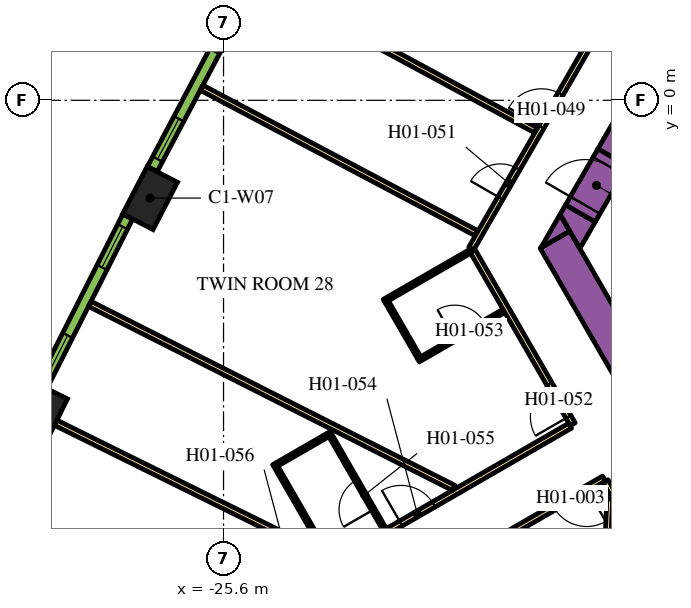
"""IFC4 building model, lengths in metres.
Left out: names, types, materials, properties, quantities, classifications, styles, units other than length and angle.
Written with IfcOpenShell. Run it as: python <this file> out.ifc"""

import sys

from ifc_helpers import new_model, si_unit, direction, frame, frame_2d, origin, origin_2d, place, context, subcontext, project, spatial, polyline, rectangle, outline, extrude, element, fill, save


model = new_model("IFC4")
c1 = context("Model", 3, precision=1e-05, world=origin(), true_north=direction((0.0, 1.0)))
c2 = subcontext(c1, "Body", "Model", "MODEL_VIEW")
j1 = project(units=[si_unit("LENGTHUNIT", "METRE"), si_unit("PLANEANGLEUNIT", "RADIAN")], contexts=[c1])
p1 = place(None, origin())
s1 = spatial("IfcSite", under=j1, at=p1, CompositionType="ELEMENT")
p2 = place(p1, origin())
s2 = spatial("IfcBuilding", under=s1, at=p2, CompositionType="ELEMENT")
p3 = place(p2, frame((0.0, 0.0, 31.5)))
s3 = spatial("IfcBuildingStorey", under=s2, at=p3, CompositionType="ELEMENT", Elevation=31.5)
for number, where, z_axis, x_axis in (
    (1, (-27.533, -2.572, 0.0), (0.0, 0.0, 1.0), (-0.459, -0.888, 0.0)),
    (2, (-30.421, -8.284, 0.0), (0.0, 0.0, 1.0), (-0.443, -0.897, 0.0)),
):
    element("IfcColumn", number, at=place(p3, frame(where, z_axis=z_axis, x_axis=x_axis)), inside=s3, PredefinedType="COLUMN", context=c2, shape_type="SweptSolid", body=[
        extrude(rectangle(XDim=1.4, YDim=0.9, at=origin_2d()), origin(), (0.0, 0.0, 1.0), 3.9),
    ])
p4 = place(p3, frame((-15.36, -1.503, 0.0), z_axis=(0.0, 0.0, 1.0), x_axis=(0.50000389221, 0.866023156604, 0.0)))
e3 = element("IfcWall", 3, at=p4, inside=s3, PredefinedType="SOLIDWALL", context=c2, shape_type="SweptSolid", body=[
    extrude(rectangle(XDim=21.0, YDim=0.9, at=frame_2d((10.5, 0.0))), origin(), (0.0, 0.0, 1.0), 3.9),
])
p5 = place(p3, frame((-12.134, -11.883, 0.0), z_axis=(0.0, 0.0, 1.0), x_axis=(-0.500005339912, 0.866022320763, 0.0)))
e4 = element("IfcWall", 4, at=p5, inside=s3, PredefinedType="SOLIDWALL", context=c2, shape_type="SweptSolid", body=[
    extrude(rectangle(XDim=9.488, YDim=0.9, at=frame_2d((4.744, 0.0))), origin(), (0.0, 0.0, 1.0), 3.9),
])
p6 = place(p3, origin())
e5 = element("IfcWall", 5, at=p6, inside=s3, PredefinedType="SOLIDWALL", context=c2, shape_type="SweptSolid", body=[
    extrude(outline(polyline([(-16.489, -3.44), (-17.251, -3.88), (-16.743, -3.0), (-16.489, -3.44)])), origin(), (0.0, 0.0, 1.0), 3.9),
])
e6 = element("IfcWall", 6, at=p6, inside=s3, PredefinedType="SOLIDWALL", context=c2, shape_type="SweptSolid", body=[
    extrude(outline(polyline([(-15.82, -3.201), (-16.223, -3.9), (-16.743, -3.0), (-16.599, -2.751), (-15.82, -3.201)])), origin(), (0.0, 0.0, 1.0), 3.9),
])
p7 = place(p3, frame((-16.209, -2.976, 0.0), z_axis=(0.0, 0.0, 1.0), x_axis=(0.499954529098, 0.86605165483, 0.0)))
e7 = element("IfcWall", 7, at=p7, inside=s3, PredefinedType="SOLIDWALL", context=c2, shape_type="SweptSolid", body=[
    extrude(rectangle(XDim=1.7, YDim=0.9, at=frame_2d((0.85, 0.0))), origin(), (0.0, 0.0, 1.0), 3.9),
])
p8 = place(p7, frame((0.25, 0.0, 0.0)))
e8 = element("IfcOpeningElement", 8, at=p8, cuts=e7, PredefinedType="OPENING", context=c2, shape_type="SweptSolid", body=[
    extrude(rectangle(XDim=1.2, YDim=2.1, at=frame_2d((0.6, 1.05))), frame((0.0, 0.46, 0.0), z_axis=(0.0, -1.0, 0.0), x_axis=(1.0, 0.0, 0.0)), (0.0, 0.0, 1.0), 0.92),
])
p9 = place(p3, frame((-19.081, -3.9, 0.0), z_axis=(0.0, 0.0, 1.0), x_axis=(0.499998313975, 0.866026377209, 0.0)))
e9 = element("IfcWall", 9, at=p9, inside=s3, PredefinedType="PARTITIONING", context=c2, shape_type="SweptSolid", body=[
    extrude(rectangle(XDim=25.766, YDim=0.15, at=frame_2d((12.883, 0.0))), origin(), (0.0, 0.0, 1.0), 2.75),
])
p10 = place(p9, frame((24.586, 0.0, 0.0)))
e10 = element("IfcOpeningElement", 10, at=p10, cuts=e9, PredefinedType="OPENING", context=c2, shape_type="SweptSolid", body=[
    extrude(rectangle(XDim=1.0, YDim=2.1, at=frame_2d((0.5, 1.05))), frame((0.0, 0.085, 0.0), z_axis=(0.0, -1.0, 0.0), x_axis=(1.0, 0.0, 0.0)), (0.0, 0.0, 1.0), 0.17),
])
p11 = place(p9, frame((16.196, 0.0, 0.0)))
e11 = element("IfcOpeningElement", 11, at=p11, cuts=e9, PredefinedType="OPENING", context=c2, shape_type="SweptSolid", body=[
    extrude(rectangle(XDim=1.0, YDim=2.1, at=frame_2d((0.5, 1.05))), frame((0.0, 0.085, 0.0), z_axis=(0.0, -1.0, 0.0), x_axis=(1.0, 0.0, 0.0)), (0.0, 0.0, 1.0), 0.17),
])
p12 = place(p9, frame((14.789, 0.0, 0.0)))
e12 = element("IfcOpeningElement", 12, at=p12, cuts=e9, PredefinedType="OPENING", context=c2, shape_type="SweptSolid", body=[
    extrude(rectangle(XDim=1.1, YDim=2.1, at=frame_2d((0.55, 1.05))), frame((0.0, 0.085, 0.0), z_axis=(0.0, -1.0, 0.0), x_axis=(1.0, 0.0, 0.0)), (0.0, 0.0, 1.0), 0.17),
])
p13 = place(p9, frame((3.698, 0.0, 0.0)))
e13 = element("IfcOpeningElement", 13, at=p13, cuts=e9, PredefinedType="OPENING", context=c2, shape_type="SweptSolid", body=[
    extrude(rectangle(XDim=1.0, YDim=2.1, at=frame_2d((0.5, 1.05))), frame((0.0, 0.085, 0.0), z_axis=(0.0, -1.0, 0.0), x_axis=(1.0, 0.0, 0.0)), (0.0, 0.0, 1.0), 0.17),
])
p14 = place(p9, frame((1.531, 0.0, 0.0)))
e14 = element("IfcOpeningElement", 14, at=p14, cuts=e9, PredefinedType="OPENING", context=c2, shape_type="SweptSolid", body=[
    extrude(rectangle(XDim=0.9, YDim=2.1, at=frame_2d((0.45, 1.05))), frame((0.0, 0.085, 0.0), z_axis=(0.0, -1.0, 0.0), x_axis=(1.0, 0.0, 0.0)), (0.0, 0.0, 1.0), 0.17),
])
p15 = place(p3, frame((-16.412, -8.523, 0.0), z_axis=(0.0, 0.0, 1.0), x_axis=(-0.500001929737, 0.866024289647, 0.0)))
e15 = element("IfcWall", 15, at=p15, inside=s3, PredefinedType="PARTITIONING", context=c2, shape_type="SweptSolid", body=[
    extrude(rectangle(XDim=5.268, YDim=0.15, at=frame_2d((2.634, 0.0))), origin(), (0.0, 0.0, 1.0), 2.75),
])
p16 = place(p15, frame((0.226, 0.0, 0.0)))
e16 = element("IfcOpeningElement", 16, at=p16, cuts=e15, PredefinedType="OPENING", context=c2, shape_type="SweptSolid", body=[
    extrude(rectangle(XDim=1.0, YDim=2.1, at=frame_2d((0.5, 1.05))), frame((0.0, 0.085, 0.0), z_axis=(0.0, -1.0, 0.0), x_axis=(1.0, 0.0, 0.0)), (0.0, 0.0, 1.0), 0.17),
])
p17 = place(p3, frame((-30.463, -16.635, 0.0), z_axis=(0.0, 0.0, 1.0), x_axis=(0.866022394896, 0.500005211512, 0.0)))
e17 = element("IfcWall", 17, at=p17, inside=s3, PredefinedType="PARTITIONING", context=c2, shape_type="SweptSolid", body=[
    extrude(rectangle(XDim=16.144, YDim=0.15, at=frame_2d((8.072, 0.0))), origin(), (0.0, 0.0, 1.0), 2.75),
])
p18 = place(p17, frame((11.004, 0.0, 0.0)))
e18 = element("IfcOpeningElement", 18, at=p18, cuts=e17, PredefinedType="OPENING", context=c2, shape_type="SweptSolid", body=[
    extrude(rectangle(XDim=1.0, YDim=2.1, at=frame_2d((0.5, 1.05))), frame((0.0, 0.085, 0.0), z_axis=(0.0, -1.0, 0.0), x_axis=(1.0, 0.0, 0.0)), (0.0, 0.0, 1.0), 0.17),
])
p19 = place(p17, frame((7.274, 0.0, 0.0)))
e19 = element("IfcOpeningElement", 19, at=p19, cuts=e17, PredefinedType="OPENING", context=c2, shape_type="SweptSolid", body=[
    extrude(rectangle(XDim=1.0, YDim=2.1, at=frame_2d((0.5, 1.05))), frame((0.0, 0.085, 0.0), z_axis=(0.0, -1.0, 0.0), x_axis=(1.0, 0.0, 0.0)), (0.0, 0.0, 1.0), 0.17),
])
p20 = place(p3, frame((-15.587, -9.952, 0.0), z_axis=(0.0, 0.0, 1.0), x_axis=(-0.866022197818, -0.500005552856, 0.0)))
e20 = element("IfcWall", 20, at=p20, inside=s3, PredefinedType="PARTITIONING", context=c2, shape_type="SweptSolid", body=[
    extrude(rectangle(XDim=16.224, YDim=0.15, at=frame_2d((8.112, 0.0))), origin(), (0.0, 0.0, 1.0), 2.75),
])
p21 = place(p20, frame((7.949, 0.0, 0.0)))
e21 = element("IfcOpeningElement", 21, at=p21, cuts=e20, PredefinedType="OPENING", context=c2, shape_type="SweptSolid", body=[
    extrude(rectangle(XDim=1.0, YDim=2.1, at=frame_2d((0.5, 1.05))), frame((0.0, 0.085, 0.0), z_axis=(0.0, -1.0, 0.0), x_axis=(1.0, 0.0, 0.0)), (0.0, 0.0, 1.0), 0.17),
])
p22 = place(p20, frame((0.525, 0.0, 0.0)))
e22 = element("IfcOpeningElement", 22, at=p22, cuts=e20, PredefinedType="OPENING", context=c2, shape_type="SweptSolid", body=[
    extrude(rectangle(XDim=1.0, YDim=2.1, at=frame_2d((0.5, 1.05))), frame((0.0, 0.085, 0.0), z_axis=(0.0, -1.0, 0.0), x_axis=(1.0, 0.0, 0.0)), (0.0, 0.0, 1.0), 0.17),
])
p23 = place(p3, frame((-12.918, -14.575, 0.0), z_axis=(0.0, 0.0, 1.0), x_axis=(-0.500009150678, 0.866020120573, 0.0)))
e23 = element("IfcWall", 23, at=p23, inside=s3, PredefinedType="PARTITIONING", context=c2, shape_type="SweptSolid", body=[
    extrude(rectangle(XDim=5.258, YDim=0.15, at=frame_2d((2.629, 0.0))), origin(), (0.0, 0.0, 1.0), 2.75),
])
p24 = place(p3, frame((-30.018, -8.483, 0.0), z_axis=(0.0, 0.0, 1.0), x_axis=(0.896544505264, -0.44295366584, 0.0)))
e24 = element("IfcWall", 24, at=p24, inside=s3, PredefinedType="PARTITIONING", context=c2, shape_type="SweptSolid", body=[
    extrude(rectangle(XDim=8.079, YDim=0.15, at=frame_2d((4.04, 0.0))), origin(), (0.0, 0.0, 1.0), 2.75),
])
p25 = place(p3, frame((-29.12, -5.356, 0.0), z_axis=(0.0, 0.0, 1.0), x_axis=(0.892401965553, -0.451241323327, 0.0)))
e25 = element("IfcWall", 25, at=p25, inside=s3, PredefinedType="PARTITIONING", context=c2, shape_type="SweptSolid", body=[
    extrude(rectangle(XDim=10.729, YDim=0.15, at=frame_2d((5.364, 0.0))), origin(), (0.0, 0.0, 1.0), 2.75),
])
p26 = place(p3, frame((-26.178, 0.331, 0.0), z_axis=(0.0, 0.0, 1.0), x_axis=(0.883908370409, -0.467660125221, 0.0)))
e26 = element("IfcWall", 26, at=p26, inside=s3, PredefinedType="PARTITIONING", context=c2, shape_type="SweptSolid", body=[
    extrude(rectangle(XDim=8.182, YDim=0.15, at=frame_2d((4.091, 0.0))), origin(), (0.0, 0.0, 1.0), 2.75),
])
p27 = place(p3, frame((-24.145, 2.871, 0.0), z_axis=(0.0, 0.0, 1.0), x_axis=(0.879551725039, -0.475803281809, 0.0)))
e27 = element("IfcWall", 27, at=p27, inside=s3, PredefinedType="PARTITIONING", context=c2, shape_type="SweptSolid", body=[
    extrude(rectangle(XDim=7.688, YDim=0.15, at=frame_2d((3.844, 0.0))), origin(), (0.0, 0.0, 1.0), 2.75),
])
p28 = place(p3, frame((-15.973, -22.109, 0.0), z_axis=(0.0, 0.0, 1.0), x_axis=(0.046191717129, 0.998932592955, 0.0)))
e28 = element("IfcWall", 28, at=p28, inside=s3, PredefinedType="PARTITIONING", context=c2, shape_type="SweptSolid", body=[
    extrude(rectangle(XDim=11.638, YDim=0.15, at=frame_2d((5.819, 0.0))), origin(), (0.0, 0.0, 1.0), 2.75),
])
p29 = place(p3, frame((-20.473, -6.84, 0.0), z_axis=(0.0, 0.0, 1.0), x_axis=(0.865997922154, 0.500047596559, 0.0)))
e29 = element("IfcWall", 29, at=p29, inside=s3, PredefinedType="PARTITIONING", context=c2, shape_type="SweptSolid", body=[
    extrude(rectangle(XDim=2.6, YDim=0.1, at=frame_2d((1.3, 0.0))), origin(), (0.0, 0.0, 1.0), 2.75),
])
p30 = place(p29, frame((1.1, 0.0, 0.0)))
e30 = element("IfcOpeningElement", 30, at=p30, cuts=e29, PredefinedType="OPENING", context=c2, shape_type="SweptSolid", body=[
    extrude(rectangle(XDim=0.9, YDim=2.1, at=frame_2d((0.45, 1.05))), frame((0.0, 0.06, 0.0), z_axis=(0.0, -1.0, 0.0), x_axis=(1.0, 0.0, 0.0)), (0.0, 0.0, 1.0), 0.12),
])
p31 = place(p3, frame((-20.455, -6.771, 0.0), z_axis=(0.0, 0.0, 1.0), x_axis=(-0.500062241894, 0.865989465428, 0.0)))
e31 = element("IfcWall", 31, at=p31, inside=s3, PredefinedType="PARTITIONING", context=c2, shape_type="SweptSolid", body=[
    extrude(rectangle(XDim=1.7, YDim=0.1, at=frame_2d((0.85, 0.0))), origin(), (0.0, 0.0, 1.0), 2.75),
])
p32 = place(p3, frame((-19.121, -3.981, 0.0), z_axis=(0.0, 0.0, 1.0), x_axis=(-0.866021400173, -0.500006934395, 0.0)))
e32 = element("IfcWall", 32, at=p32, inside=s3, PredefinedType="PARTITIONING", context=c2, shape_type="SweptSolid", body=[
    extrude(rectangle(XDim=2.6, YDim=0.1, at=frame_2d((1.3, 0.0))), origin(), (0.0, 0.0, 1.0), 2.75),
])
p33 = place(p3, frame((-21.36, -11.293, 0.0), z_axis=(0.0, 0.0, 1.0), x_axis=(-0.49997559174, 0.866039495442, 0.0)))
e33 = element("IfcWall", 33, at=p33, inside=s3, PredefinedType="PARTITIONING", context=c2, shape_type="SweptSolid", body=[
    extrude(rectangle(XDim=2.95, YDim=0.1, at=frame_2d((1.475, 0.0))), origin(), (0.0, 0.0, 1.0), 2.75),
])
p34 = place(p33, frame((0.6, 0.0, 0.0)))
e34 = element("IfcOpeningElement", 34, at=p34, cuts=e33, PredefinedType="OPENING", context=c2, shape_type="SweptSolid", body=[
    extrude(rectangle(XDim=0.9, YDim=2.1, at=frame_2d((0.45, 1.05))), frame((0.0, 0.06, 0.0), z_axis=(0.0, -1.0, 0.0), x_axis=(1.0, 0.0, 0.0)), (0.0, 0.0, 1.0), 0.12),
])
p35 = place(p3, frame((-22.853, -8.806, 0.0), z_axis=(0.0, 0.0, 1.0), x_axis=(-0.86601511528, -0.500017819788, 0.0)))
e35 = element("IfcWall", 35, at=p35, inside=s3, PredefinedType="PARTITIONING", context=c2, shape_type="SweptSolid", body=[
    extrude(rectangle(XDim=1.55, YDim=0.1, at=frame_2d((0.775, 0.0))), origin(), (0.0, 0.0, 1.0), 2.75),
])
p36 = place(p3, frame((-22.944, -11.85, 0.0), z_axis=(0.0, 0.0, 1.0), x_axis=(-0.499938597367, 0.866060851709, 0.0)))
e36 = element("IfcWall", 36, at=p36, inside=s3, PredefinedType="PARTITIONING", context=c2, shape_type="SweptSolid", body=[
    extrude(rectangle(XDim=2.64, YDim=0.1, at=frame_2d((1.32, 0.0))), origin(), (0.0, 0.0, 1.0), 2.75),
])
p37 = place(p3, frame((-25.138, 2.608, 0.0), z_axis=(0.0, 0.0, 1.0), x_axis=(-0.467629620899, -0.883924509026, 0.0)))
e37 = element("IfcWall", 37, at=p37, inside=s3, PredefinedType="SOLIDWALL", context=c2, shape_type="SweptSolid", body=[
    extrude(rectangle(XDim=4.998, YDim=0.29, at=frame_2d((2.499, 0.0))), origin(), (0.0, 0.0, 1.0), 3.65),
])
p38 = place(p37, frame((0.297, 0.0, 0.9)))
e38 = element("IfcOpeningElement", 38, at=p38, cuts=e37, PredefinedType="OPENING", context=c2, shape_type="SweptSolid", body=[
    extrude(rectangle(XDim=1.2, YDim=2.15, at=frame_2d((0.6, 1.075))), frame((0.0, 0.155, 0.0), z_axis=(0.0, -1.0, 0.0), x_axis=(1.0, 0.0, 0.0)), (0.0, 0.0, 1.0), 0.31),
])
p39 = place(p37, frame((3.501, 0.0, 0.9)))
e39 = element("IfcOpeningElement", 39, at=p39, cuts=e37, PredefinedType="OPENING", context=c2, shape_type="SweptSolid", body=[
    extrude(rectangle(XDim=1.2, YDim=2.15, at=frame_2d((0.6, 1.075))), frame((0.0, 0.155, 0.0), z_axis=(0.0, -1.0, 0.0), x_axis=(1.0, 0.0, 0.0)), (0.0, 0.0, 1.0), 0.31),
])
p40 = place(p3, frame((-28.122, -3.06, 0.0), z_axis=(0.0, 0.0, 1.0), x_axis=(-0.451233929645, -0.892405704115, 0.0)))
e40 = element("IfcWall", 40, at=p40, inside=s3, PredefinedType="SOLIDWALL", context=c2, shape_type="SweptSolid", body=[
    extrude(rectangle(XDim=4.998, YDim=0.29, at=frame_2d((2.499, 0.0))), origin(), (0.0, 0.0, 1.0), 3.65),
])
p41 = place(p40, frame((0.297, 0.0, 0.9)))
e41 = element("IfcOpeningElement", 41, at=p41, cuts=e40, PredefinedType="OPENING", context=c2, shape_type="SweptSolid", body=[
    extrude(rectangle(XDim=1.2, YDim=2.15, at=frame_2d((0.6, 1.075))), frame((0.0, 0.155, 0.0), z_axis=(0.0, -1.0, 0.0), x_axis=(1.0, 0.0, 0.0)), (0.0, 0.0, 1.0), 0.31),
])
p42 = place(p40, frame((3.501, 0.0, 0.9)))
e42 = element("IfcOpeningElement", 42, at=p42, cuts=e40, PredefinedType="OPENING", context=c2, shape_type="SweptSolid", body=[
    extrude(rectangle(XDim=1.2, YDim=2.15, at=frame_2d((0.6, 1.075))), frame((0.0, 0.155, 0.0), z_axis=(0.0, -1.0, 0.0), x_axis=(1.0, 0.0, 0.0)), (0.0, 0.0, 1.0), 0.31),
])
p43 = place(p8, origin())
e43 = element("IfcDoor", 43, at=p43, inside=s3, OperationType="SINGLE_SWING_LEFT", PredefinedType="DOOR", context=c2, shape_type="SweptSolid", body=[
    extrude(rectangle(XDim=1.2, YDim=2.1, at=frame_2d((0.6, 1.05))), frame((0.0, 0.025, 0.0), z_axis=(0.0, -1.0, 0.0), x_axis=(1.0, 0.0, 0.0)), (0.0, 0.0, 1.0), 0.05),
])
fill(e8, e43)
p44 = place(p22, origin())
e44 = element("IfcDoor", 44, at=p44, inside=s3, OperationType="SINGLE_SWING_LEFT", PredefinedType="DOOR", context=c2, shape_type="SweptSolid", body=[
    extrude(rectangle(XDim=1.0, YDim=2.1, at=frame_2d((0.5, 1.05))), frame((0.0, 0.025, 0.0), z_axis=(0.0, -1.0, 0.0), x_axis=(1.0, 0.0, 0.0)), (0.0, 0.0, 1.0), 0.05),
])
fill(e22, e44)
p45 = place(p13, origin())
e45 = element("IfcDoor", 45, at=p45, inside=s3, OperationType="SINGLE_SWING_LEFT", PredefinedType="DOOR", context=c2, shape_type="SweptSolid", body=[
    extrude(rectangle(XDim=1.0, YDim=2.1, at=frame_2d((0.5, 1.05))), frame((0.0, 0.025, 0.0), z_axis=(0.0, -1.0, 0.0), x_axis=(1.0, 0.0, 0.0)), (0.0, 0.0, 1.0), 0.05),
])
fill(e13, e45)
p46 = place(p14, origin())
e46 = element("IfcDoor", 46, at=p46, inside=s3, OperationType="SINGLE_SWING_LEFT", PredefinedType="DOOR", context=c2, shape_type="SweptSolid", body=[
    extrude(rectangle(XDim=0.9, YDim=2.1, at=frame_2d((0.45, 1.05))), frame((0.0, 0.025, 0.0), z_axis=(0.0, -1.0, 0.0), x_axis=(1.0, 0.0, 0.0)), (0.0, 0.0, 1.0), 0.05),
])
fill(e14, e46)
p47 = place(p16, origin())
e47 = element("IfcDoor", 47, at=p47, inside=s3, OperationType="SINGLE_SWING_LEFT", PredefinedType="DOOR", context=c2, shape_type="SweptSolid", body=[
    extrude(rectangle(XDim=1.0, YDim=2.1, at=frame_2d((0.5, 1.05))), frame((0.0, 0.025, 0.0), z_axis=(0.0, -1.0, 0.0), x_axis=(1.0, 0.0, 0.0)), (0.0, 0.0, 1.0), 0.05),
])
fill(e16, e47)
p48 = place(p30, origin())
e48 = element("IfcDoor", 48, at=p48, inside=s3, OperationType="SINGLE_SWING_LEFT", PredefinedType="DOOR", context=c2, shape_type="SweptSolid", body=[
    extrude(rectangle(XDim=0.9, YDim=2.1, at=frame_2d((0.45, 1.05))), frame((0.0, 0.025, 0.0), z_axis=(0.0, -1.0, 0.0), x_axis=(1.0, 0.0, 0.0)), (0.0, 0.0, 1.0), 0.05),
])
fill(e30, e48)
p49 = place(p18, origin())
e49 = element("IfcDoor", 49, at=p49, inside=s3, OperationType="SINGLE_SWING_RIGHT", PredefinedType="DOOR", context=c2, shape_type="SweptSolid", body=[
    extrude(rectangle(XDim=1.0, YDim=2.1, at=frame_2d((0.5, 1.05))), frame((0.0, 0.025, 0.0), z_axis=(0.0, -1.0, 0.0), x_axis=(1.0, 0.0, 0.0)), (0.0, 0.0, 1.0), 0.05),
])
fill(e18, e49)
p50 = place(p34, origin())
e50 = element("IfcDoor", 50, at=p50, inside=s3, OperationType="SINGLE_SWING_LEFT", PredefinedType="DOOR", context=c2, shape_type="SweptSolid", body=[
    extrude(rectangle(XDim=0.9, YDim=2.1, at=frame_2d((0.45, 1.05))), frame((0.0, 0.025, 0.0), z_axis=(0.0, -1.0, 0.0), x_axis=(1.0, 0.0, 0.0)), (0.0, 0.0, 1.0), 0.05),
])
fill(e34, e50)
p51 = place(p39, origin())
e51 = element("IfcWindow", 51, at=p51, inside=s3, PartitioningType="DOUBLE_PANEL_VERTICAL", PredefinedType="WINDOW", context=c2, shape_type="SweptSolid", body=[
    extrude(rectangle(XDim=1.2, YDim=2.15, at=frame_2d((0.6, 1.075))), frame((0.0, 0.015, 0.0), z_axis=(0.0, -1.0, 0.0), x_axis=(1.0, 0.0, 0.0)), (0.0, 0.0, 1.0), 0.06),
])
fill(e39, e51)
p52 = place(p41, origin())
e52 = element("IfcWindow", 52, at=p52, inside=s3, PartitioningType="DOUBLE_PANEL_VERTICAL", PredefinedType="WINDOW", context=c2, shape_type="SweptSolid", body=[
    extrude(rectangle(XDim=1.2, YDim=2.15, at=frame_2d((0.6, 1.075))), frame((0.0, 0.015, 0.0), z_axis=(0.0, -1.0, 0.0), x_axis=(1.0, 0.0, 0.0)), (0.0, 0.0, 1.0), 0.06),
])
fill(e41, e52)
p53 = place(p42, origin())
e53 = element("IfcWindow", 53, at=p53, inside=s3, PartitioningType="DOUBLE_PANEL_VERTICAL", PredefinedType="WINDOW", context=c2, shape_type="SweptSolid", body=[
    extrude(rectangle(XDim=1.2, YDim=2.15, at=frame_2d((0.6, 1.075))), frame((0.0, 0.015, 0.0), z_axis=(0.0, -1.0, 0.0), x_axis=(1.0, 0.0, 0.0)), (0.0, 0.0, 1.0), 0.06),
])
fill(e42, e53)
save(model, sys.argv[1])
